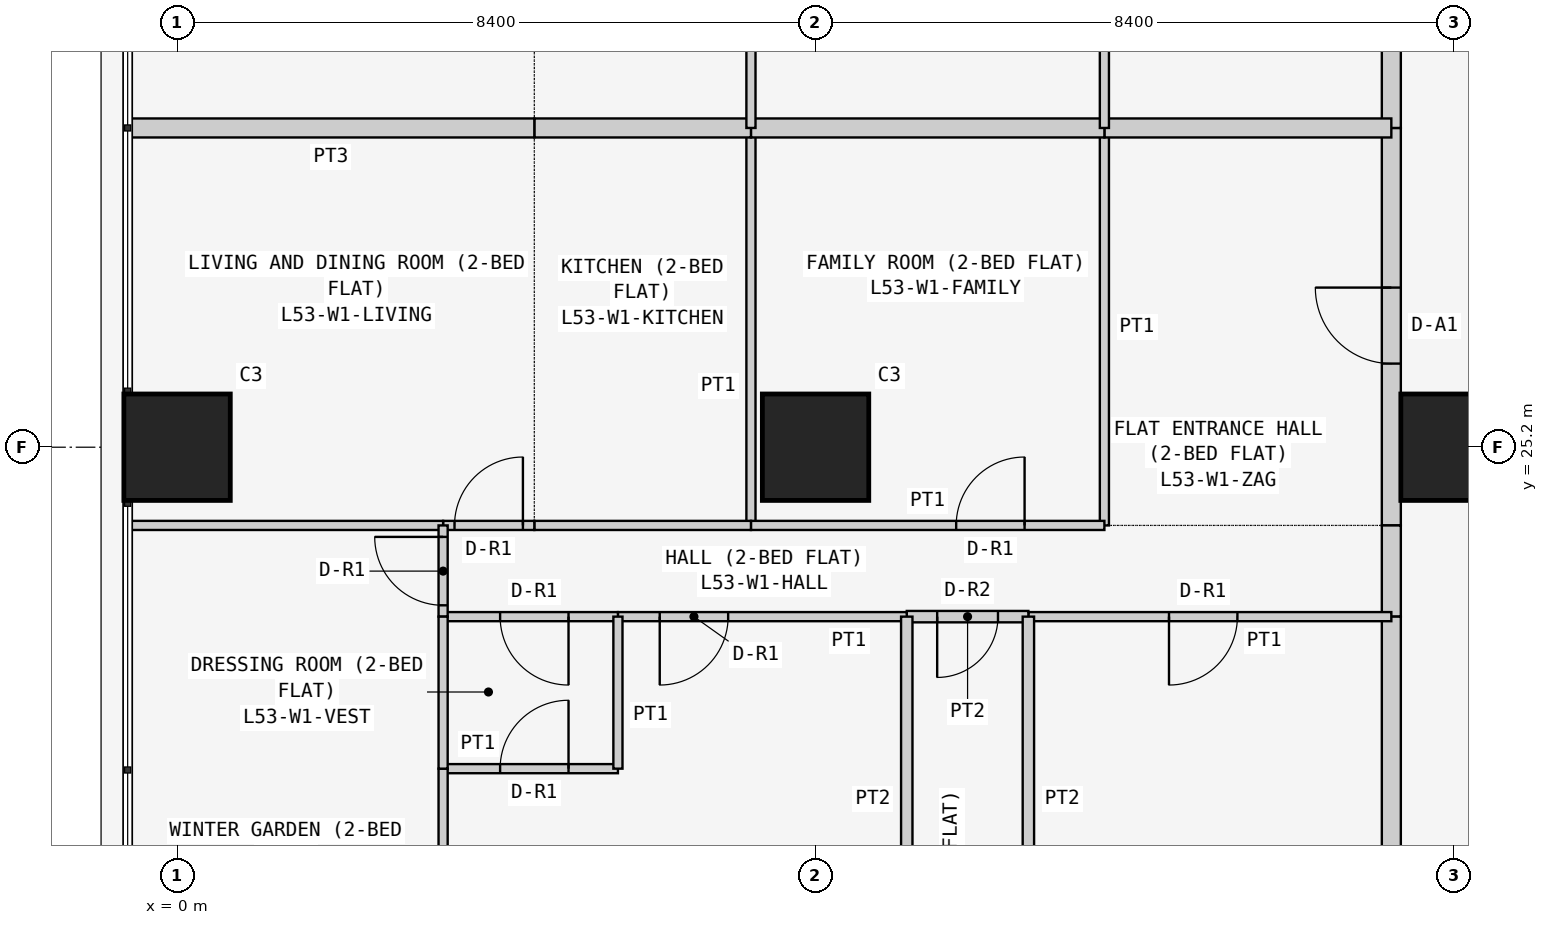
"""IFC4 building model, lengths in metres.
Left out: names, types, materials, properties, quantities, classifications, styles, units other than length and angle.
Written with IfcOpenShell. Run it as: python <this file> out.ifc"""

import sys

from ifc_helpers import new_model, si_unit, direction, frame, frame_2d, origin, origin_2d, place, context, subcontext, project, spatial, rectangle, extrude, element, fill, save


model = new_model("IFC4")
c1 = context("Model", 3, precision=1e-05, world=origin(), true_north=direction((0.0, 1.0)))
c2 = subcontext(c1, "Body", "Model", "MODEL_VIEW")
j1 = project(units=[si_unit("LENGTHUNIT", "METRE"), si_unit("PLANEANGLEUNIT", "RADIAN")], contexts=[c1])
p1 = place(None, origin())
s1 = spatial("IfcSite", under=j1, at=p1, CompositionType="ELEMENT")
p2 = place(p1, origin())
s2 = spatial("IfcBuilding", under=s1, at=p2, CompositionType="ELEMENT")
p3 = place(p2, frame((0.0, 0.0, 204.9)))
s3 = spatial("IfcBuildingStorey", under=s2, at=p3, CompositionType="ELEMENT", Elevation=204.9)
for number, where, z_axis, x_axis in (
    (1, (0.0, 25.2, 0.0), (0.0, 0.0, 1.0), (1.0, 0.0, 0.0)),
    (2, (8.4, 25.2, 0.0), (0.0, 0.0, 1.0), (1.0, 0.0, 0.0)),
    (3, (16.8, 25.2, 0.0), (0.0, 0.0, 1.0), (1.0, 0.0, 0.0)),
):
    element("IfcColumn", number, at=place(p3, frame(where, z_axis=z_axis, x_axis=x_axis)), inside=s3, PredefinedType="COLUMN", context=c2, shape_type="SweptSolid", body=[
        extrude(rectangle(XDim=1.4, YDim=1.4, at=origin_2d()), origin(), (0.0, 0.0, 1.0), 3.6),
    ])
p4 = place(p3, frame((15.975, 24.171, 0.0), z_axis=(0.0, 0.0, 1.0), x_axis=(0.0, 1.0, 0.0)))
e4 = element("IfcWall", 4, at=p4, inside=s3, PredefinedType="PARTITIONING", context=c2, shape_type="SweptSolid", body=[
    extrude(rectangle(XDim=5.229, YDim=0.25, at=frame_2d((2.615, 0.0))), origin(), (0.0, 0.0, 1.0), 3.45),
])
p5 = place(p4, frame((2.129, 0.0, 0.0)))
e5 = element("IfcOpeningElement", 5, at=p5, cuts=e4, PredefinedType="OPENING", context=c2, shape_type="SweptSolid", body=[
    extrude(rectangle(XDim=1.0, YDim=2.1, at=frame_2d((0.5, 1.05))), frame((0.0, 0.135, 0.0), z_axis=(0.0, -1.0, 0.0), x_axis=(1.0, 0.0, 0.0)), (0.0, 0.0, 1.0), 0.27),
])
p6 = place(p3, frame((15.975, 22.971, 0.0), z_axis=(0.0, 0.0, 1.0), x_axis=(0.0, 1.0, 0.0)))
e6 = element("IfcWall", 6, at=p6, inside=s3, PredefinedType="PARTITIONING", context=c2, shape_type="SweptSolid", body=[
    extrude(rectangle(XDim=1.2, YDim=0.25, at=frame_2d((0.6, 0.0))), origin(), (0.0, 0.0, 1.0), 3.45),
])
p7 = place(p3, frame((15.975, 16.1, 0.0), z_axis=(0.0, 0.0, 1.0), x_axis=(0.0, 1.0, 0.0)))
e7 = element("IfcWall", 7, at=p7, inside=s3, PredefinedType="PARTITIONING", context=c2, shape_type="SweptSolid", body=[
    extrude(rectangle(XDim=6.871, YDim=0.25, at=frame_2d((3.436, 0.0))), origin(), (0.0, 0.0, 1.0), 3.45),
])
p8 = place(p3, frame((15.975, 29.4, 0.0), z_axis=(0.0, 0.0, 1.0), x_axis=(0.0, 1.0, 0.0)))
e8 = element("IfcWall", 8, at=p8, inside=s3, PredefinedType="PARTITIONING", context=c2, shape_type="SweptSolid", body=[
    extrude(rectangle(XDim=5.229, YDim=0.25, at=frame_2d((2.615, 0.0))), origin(), (0.0, 0.0, 1.0), 3.45),
])
p9 = place(p8, frame((2.1, 0.0, 0.0)))
e9 = element("IfcOpeningElement", 9, at=p9, cuts=e8, PredefinedType="OPENING", context=c2, shape_type="SweptSolid", body=[
    extrude(rectangle(XDim=1.0, YDim=2.1, at=frame_2d((0.5, 1.05))), frame((0.0, 0.135, 0.0), z_axis=(0.0, -1.0, 0.0), x_axis=(1.0, 0.0, 0.0)), (0.0, 0.0, 1.0), 0.27),
])
p10 = place(p3, frame((12.2, 29.4, 0.0), z_axis=(0.0, 0.0, 1.0), x_axis=(0.0, -1.0, 0.0)))
e10 = element("IfcWall", 10, at=p10, inside=s3, PredefinedType="PARTITIONING", context=c2, shape_type="SweptSolid", body=[
    extrude(rectangle(XDim=5.229, YDim=0.12, at=frame_2d((2.615, 0.0))), origin(), (0.0, 0.0, 1.0), 3.45),
])
p11 = place(p3, frame((15.975, 29.4, 0.0), z_axis=(0.0, 0.0, 1.0), x_axis=(-1.0, 0.0, 0.0)))
e11 = element("IfcWall", 11, at=p11, inside=s3, PredefinedType="PARTITIONING", context=c2, shape_type="SweptSolid", body=[
    extrude(rectangle(XDim=3.775, YDim=0.25, at=frame_2d((1.888, 0.0))), origin(), (0.0, 0.0, 1.0), 3.45),
])
p12 = place(p3, frame((7.55, 29.4, 0.0), z_axis=(0.0, 0.0, 1.0), x_axis=(0.0, -1.0, 0.0)))
e12 = element("IfcWall", 12, at=p12, inside=s3, PredefinedType="PARTITIONING", context=c2, shape_type="SweptSolid", body=[
    extrude(rectangle(XDim=5.229, YDim=0.12, at=frame_2d((2.615, 0.0))), origin(), (0.0, 0.0, 1.0), 3.45),
])
p13 = place(p3, frame((7.55, 24.171, 0.0), z_axis=(0.0, 0.0, 1.0), x_axis=(1.0, 0.0, 0.0)))
e13 = element("IfcWall", 13, at=p13, inside=s3, PredefinedType="PARTITIONING", context=c2, shape_type="SweptSolid", body=[
    extrude(rectangle(XDim=4.65, YDim=0.12, at=frame_2d((2.325, 0.0))), origin(), (0.0, 0.0, 1.0), 3.45),
])
p14 = place(p13, frame((2.7, 0.0, 0.0)))
e14 = element("IfcOpeningElement", 14, at=p14, cuts=e13, PredefinedType="OPENING", context=c2, shape_type="SweptSolid", body=[
    extrude(rectangle(XDim=0.9, YDim=2.1, at=frame_2d((0.45, 1.05))), frame((0.0, 0.07, 0.0), z_axis=(0.0, -1.0, 0.0), x_axis=(1.0, 0.0, 0.0)), (0.0, 0.0, 1.0), 0.14),
])
p15 = place(p3, frame((12.2, 29.4, 0.0), z_axis=(0.0, 0.0, 1.0), x_axis=(-1.0, 0.0, 0.0)))
e15 = element("IfcWall", 15, at=p15, inside=s3, PredefinedType="PARTITIONING", context=c2, shape_type="SweptSolid", body=[
    extrude(rectangle(XDim=4.65, YDim=0.25, at=frame_2d((2.325, 0.0))), origin(), (0.0, 0.0, 1.0), 3.45),
])
p16 = place(p3, frame((4.7, 24.171, 0.0), z_axis=(0.0, 0.0, 1.0), x_axis=(1.0, 0.0, 0.0)))
e16 = element("IfcWall", 16, at=p16, inside=s3, PredefinedType="PARTITIONING", context=c2, shape_type="SweptSolid", body=[
    extrude(rectangle(XDim=2.85, YDim=0.12, at=frame_2d((1.425, 0.0))), origin(), (0.0, 0.0, 1.0), 3.45),
])
p17 = place(p3, frame((7.55, 29.4, 0.0), z_axis=(0.0, 0.0, 1.0), x_axis=(-1.0, 0.0, 0.0)))
e17 = element("IfcWall", 17, at=p17, inside=s3, PredefinedType="PARTITIONING", context=c2, shape_type="SweptSolid", body=[
    extrude(rectangle(XDim=2.85, YDim=0.25, at=frame_2d((1.425, 0.0))), origin(), (0.0, 0.0, 1.0), 3.45),
])
p18 = place(p3, frame((3.5, 24.171, 0.0), z_axis=(0.0, 0.0, 1.0), x_axis=(1.0, 0.0, 0.0)))
e18 = element("IfcWall", 18, at=p18, inside=s3, PredefinedType="PARTITIONING", context=c2, shape_type="SweptSolid", body=[
    extrude(rectangle(XDim=1.2, YDim=0.12, at=frame_2d((0.6, 0.0))), origin(), (0.0, 0.0, 1.0), 3.45),
])
p19 = place(p18, frame((0.15, 0.0, 0.0)))
e19 = element("IfcOpeningElement", 19, at=p19, cuts=e18, PredefinedType="OPENING", context=c2, shape_type="SweptSolid", body=[
    extrude(rectangle(XDim=0.9, YDim=2.1, at=frame_2d((0.45, 1.05))), frame((0.0, 0.07, 0.0), z_axis=(0.0, -1.0, 0.0), x_axis=(1.0, 0.0, 0.0)), (0.0, 0.0, 1.0), 0.14),
])
p20 = place(p3, frame((-0.65, 24.171, 0.0), z_axis=(0.0, 0.0, 1.0), x_axis=(1.0, 0.0, 0.0)))
e20 = element("IfcWall", 20, at=p20, inside=s3, PredefinedType="PARTITIONING", context=c2, shape_type="SweptSolid", body=[
    extrude(rectangle(XDim=4.15, YDim=0.12, at=frame_2d((2.075, 0.0))), origin(), (0.0, 0.0, 1.0), 3.45),
])
p21 = place(p3, frame((4.7, 29.4, 0.0), z_axis=(0.0, 0.0, 1.0), x_axis=(-1.0, 0.0, 0.0)))
e21 = element("IfcWall", 21, at=p21, inside=s3, PredefinedType="PARTITIONING", context=c2, shape_type="SweptSolid", body=[
    extrude(rectangle(XDim=5.35, YDim=0.25, at=frame_2d((2.675, 0.0))), origin(), (0.0, 0.0, 1.0), 3.45),
])
p22 = place(p3, frame((11.2, 22.971, 0.0), z_axis=(0.0, 0.0, 1.0), x_axis=(1.0, 0.0, 0.0)))
e22 = element("IfcWall", 22, at=p22, inside=s3, PredefinedType="PARTITIONING", context=c2, shape_type="SweptSolid", body=[
    extrude(rectangle(XDim=4.775, YDim=0.12, at=frame_2d((2.388, 0.0))), origin(), (0.0, 0.0, 1.0), 3.45),
])
p23 = place(p22, frame((1.85, 0.0, 0.0)))
e23 = element("IfcOpeningElement", 23, at=p23, cuts=e22, PredefinedType="OPENING", context=c2, shape_type="SweptSolid", body=[
    extrude(rectangle(XDim=0.9, YDim=2.1, at=frame_2d((0.45, 1.05))), frame((0.0, 0.07, 0.0), z_axis=(0.0, -1.0, 0.0), x_axis=(1.0, 0.0, 0.0)), (0.0, 0.0, 1.0), 0.14),
])
p24 = place(p3, frame((9.6, 22.971, 0.0), z_axis=(0.0, 0.0, 1.0), x_axis=(1.0, 0.0, 0.0)))
e24 = element("IfcWall", 24, at=p24, inside=s3, PredefinedType="PARTITIONING", context=c2, shape_type="SweptSolid", body=[
    extrude(rectangle(XDim=1.6, YDim=0.15, at=frame_2d((0.8, 0.0))), origin(), (0.0, 0.0, 1.0), 3.45),
])
p25 = place(p24, frame((0.4, 0.0, 0.0)))
e25 = element("IfcOpeningElement", 25, at=p25, cuts=e24, PredefinedType="OPENING", context=c2, shape_type="SweptSolid", body=[
    extrude(rectangle(XDim=0.8, YDim=2.1, at=frame_2d((0.4, 1.05))), frame((0.0, 0.085, 0.0), z_axis=(0.0, -1.0, 0.0), x_axis=(1.0, 0.0, 0.0)), (0.0, 0.0, 1.0), 0.17),
])
p26 = place(p3, frame((5.8, 22.971, 0.0), z_axis=(0.0, 0.0, 1.0), x_axis=(1.0, 0.0, 0.0)))
e26 = element("IfcWall", 26, at=p26, inside=s3, PredefinedType="PARTITIONING", context=c2, shape_type="SweptSolid", body=[
    extrude(rectangle(XDim=3.8, YDim=0.12, at=frame_2d((1.9, 0.0))), origin(), (0.0, 0.0, 1.0), 3.45),
])
p27 = place(p26, frame((0.55, 0.0, 0.0)))
e27 = element("IfcOpeningElement", 27, at=p27, cuts=e26, PredefinedType="OPENING", context=c2, shape_type="SweptSolid", body=[
    extrude(rectangle(XDim=0.9, YDim=2.1, at=frame_2d((0.45, 1.05))), frame((0.0, 0.07, 0.0), z_axis=(0.0, -1.0, 0.0), x_axis=(1.0, 0.0, 0.0)), (0.0, 0.0, 1.0), 0.14),
])
p28 = place(p3, frame((3.5, 22.971, 0.0), z_axis=(0.0, 0.0, 1.0), x_axis=(1.0, 0.0, 0.0)))
e28 = element("IfcWall", 28, at=p28, inside=s3, PredefinedType="PARTITIONING", context=c2, shape_type="SweptSolid", body=[
    extrude(rectangle(XDim=2.3, YDim=0.12, at=frame_2d((1.15, 0.0))), origin(), (0.0, 0.0, 1.0), 3.45),
])
p29 = place(p28, frame((0.75, 0.0, 0.0)))
e29 = element("IfcOpeningElement", 29, at=p29, cuts=e28, PredefinedType="OPENING", context=c2, shape_type="SweptSolid", body=[
    extrude(rectangle(XDim=0.9, YDim=2.1, at=frame_2d((0.45, 1.05))), frame((0.0, 0.07, 0.0), z_axis=(0.0, -1.0, 0.0), x_axis=(1.0, 0.0, 0.0)), (0.0, 0.0, 1.0), 0.14),
])
p30 = place(p3, frame((3.5, 24.171, 0.0), z_axis=(0.0, 0.0, 1.0), x_axis=(0.0, -1.0, 0.0)))
e30 = element("IfcWall", 30, at=p30, inside=s3, PredefinedType="PARTITIONING", context=c2, shape_type="SweptSolid", body=[
    extrude(rectangle(XDim=1.2, YDim=0.12, at=frame_2d((0.6, 0.0))), origin(), (0.0, 0.0, 1.0), 3.45),
])
p31 = place(p30, frame((0.151, 0.0, 0.0)))
e31 = element("IfcOpeningElement", 31, at=p31, cuts=e30, PredefinedType="OPENING", context=c2, shape_type="SweptSolid", body=[
    extrude(rectangle(XDim=0.9, YDim=2.1, at=frame_2d((0.45, 1.05))), frame((0.0, 0.07, 0.0), z_axis=(0.0, -1.0, 0.0), x_axis=(1.0, 0.0, 0.0)), (0.0, 0.0, 1.0), 0.14),
])
for number, where, z_axis, x_axis in (
    (32, (11.2, 22.971, 0.0), (0.0, 0.0, 1.0), (0.0, -1.0, 0.0)),
    (33, (9.6, 22.971, 0.0), (0.0, 0.0, 1.0), (0.0, -1.0, 0.0)),
):
    element("IfcWall", number, at=place(p3, frame(where, z_axis=z_axis, x_axis=x_axis)), inside=s3, PredefinedType="PARTITIONING", context=c2, shape_type="SweptSolid", body=[
        extrude(rectangle(XDim=6.871, YDim=0.15, at=frame_2d((3.436, 0.0))), origin(), (0.0, 0.0, 1.0), 3.45),
    ])
p32 = place(p3, frame((3.5, 20.971, 0.0), z_axis=(0.0, 0.0, 1.0), x_axis=(1.0, 0.0, 0.0)))
e34 = element("IfcWall", 34, at=p32, inside=s3, PredefinedType="PARTITIONING", context=c2, shape_type="SweptSolid", body=[
    extrude(rectangle(XDim=2.3, YDim=0.12, at=frame_2d((1.15, 0.0))), origin(), (0.0, 0.0, 1.0), 3.45),
])
p33 = place(p32, frame((0.75, 0.0, 0.0)))
e35 = element("IfcOpeningElement", 35, at=p33, cuts=e34, PredefinedType="OPENING", context=c2, shape_type="SweptSolid", body=[
    extrude(rectangle(XDim=0.9, YDim=2.1, at=frame_2d((0.45, 1.05))), frame((0.0, 0.07, 0.0), z_axis=(0.0, -1.0, 0.0), x_axis=(1.0, 0.0, 0.0)), (0.0, 0.0, 1.0), 0.14),
])
p34 = place(p3, frame((5.8, 20.971, 0.0), z_axis=(0.0, 0.0, 1.0), x_axis=(0.0, 1.0, 0.0)))
e36 = element("IfcWall", 36, at=p34, inside=s3, PredefinedType="PARTITIONING", context=c2, shape_type="SweptSolid", body=[
    extrude(rectangle(XDim=2.0, YDim=0.12, at=frame_2d((1.0, 0.0))), origin(), (0.0, 0.0, 1.0), 3.45),
])
p35 = place(p3, frame((3.5, 16.1, 0.0), z_axis=(0.0, 0.0, 1.0), x_axis=(0.0, 1.0, 0.0)))
e37 = element("IfcWall", 37, at=p35, inside=s3, PredefinedType="PARTITIONING", context=c2, shape_type="SweptSolid", body=[
    extrude(rectangle(XDim=4.871, YDim=0.12, at=frame_2d((2.436, 0.0))), origin(), (0.0, 0.0, 1.0), 3.45),
])
p36 = place(p3, frame((3.5, 22.971, 0.0), z_axis=(0.0, 0.0, 1.0), x_axis=(0.0, -1.0, 0.0)))
e38 = element("IfcWall", 38, at=p36, inside=s3, PredefinedType="PARTITIONING", context=c2, shape_type="SweptSolid", body=[
    extrude(rectangle(XDim=2.0, YDim=0.12, at=frame_2d((1.0, 0.0))), origin(), (0.0, 0.0, 1.0), 3.45),
])
for number, where, z_axis, x_axis in (
    (39, (12.2, 29.4, 0.0), (0.0, 0.0, 1.0), (0.0, 1.0, 0.0)),
    (40, (7.55, 29.4, 0.0), (0.0, 0.0, 1.0), (0.0, 1.0, 0.0)),
):
    element("IfcWall", number, at=place(p3, frame(where, z_axis=z_axis, x_axis=x_axis)), inside=s3, PredefinedType="PARTITIONING", context=c2, shape_type="SweptSolid", body=[
        extrude(rectangle(XDim=5.229, YDim=0.12, at=frame_2d((2.615, 0.0))), origin(), (0.0, 0.0, 1.0), 3.45),
    ])
p37 = place(p5, origin())
e41 = element("IfcDoor", 41, at=p37, inside=s3, OperationType="SINGLE_SWING_RIGHT", PredefinedType="DOOR", context=c2, shape_type="SweptSolid", body=[
    extrude(rectangle(XDim=1.0, YDim=2.1, at=frame_2d((0.5, 1.05))), frame((0.0, 0.025, 0.0), z_axis=(0.0, -1.0, 0.0), x_axis=(1.0, 0.0, 0.0)), (0.0, 0.0, 1.0), 0.05),
])
fill(e5, e41)
p38 = place(p14, origin())
e42 = element("IfcDoor", 42, at=p38, inside=s3, OperationType="SINGLE_SWING_RIGHT", PredefinedType="DOOR", context=c2, shape_type="SweptSolid", body=[
    extrude(rectangle(XDim=0.9, YDim=2.1, at=frame_2d((0.45, 1.05))), frame((0.0, 0.025, 0.0), z_axis=(0.0, -1.0, 0.0), x_axis=(1.0, 0.0, 0.0)), (0.0, 0.0, 1.0), 0.05),
])
fill(e14, e42)
p39 = place(p19, origin())
e43 = element("IfcDoor", 43, at=p39, inside=s3, OperationType="SINGLE_SWING_RIGHT", PredefinedType="DOOR", context=c2, shape_type="SweptSolid", body=[
    extrude(rectangle(XDim=0.9, YDim=2.1, at=frame_2d((0.45, 1.05))), frame((0.0, 0.025, 0.0), z_axis=(0.0, -1.0, 0.0), x_axis=(1.0, 0.0, 0.0)), (0.0, 0.0, 1.0), 0.05),
])
fill(e19, e43)
p40 = place(p23, frame((0.9, 0.0, 0.0), z_axis=(0.0, 0.0, 1.0), x_axis=(-1.0, 0.0, 0.0)))
e44 = element("IfcDoor", 44, at=p40, inside=s3, OperationType="SINGLE_SWING_RIGHT", PredefinedType="DOOR", context=c2, shape_type="SweptSolid", body=[
    extrude(rectangle(XDim=0.9, YDim=2.1, at=frame_2d((0.45, 1.05))), frame((0.0, 0.025, 0.0), z_axis=(0.0, -1.0, 0.0), x_axis=(1.0, 0.0, 0.0)), (0.0, 0.0, 1.0), 0.05),
])
fill(e23, e44)
p41 = place(p25, frame((0.8, 0.0, 0.0), z_axis=(0.0, 0.0, 1.0), x_axis=(-1.0, 0.0, 0.0)))
e45 = element("IfcDoor", 45, at=p41, inside=s3, OperationType="SINGLE_SWING_RIGHT", PredefinedType="DOOR", context=c2, shape_type="SweptSolid", body=[
    extrude(rectangle(XDim=0.8, YDim=2.1, at=frame_2d((0.4, 1.05))), frame((0.0, 0.025, 0.0), z_axis=(0.0, -1.0, 0.0), x_axis=(1.0, 0.0, 0.0)), (0.0, 0.0, 1.0), 0.05),
])
fill(e25, e45)
p42 = place(p27, frame((0.9, 0.0, 0.0), z_axis=(0.0, 0.0, 1.0), x_axis=(-1.0, 0.0, 0.0)))
e46 = element("IfcDoor", 46, at=p42, inside=s3, OperationType="SINGLE_SWING_RIGHT", PredefinedType="DOOR", context=c2, shape_type="SweptSolid", body=[
    extrude(rectangle(XDim=0.9, YDim=2.1, at=frame_2d((0.45, 1.05))), frame((0.0, 0.025, 0.0), z_axis=(0.0, -1.0, 0.0), x_axis=(1.0, 0.0, 0.0)), (0.0, 0.0, 1.0), 0.05),
])
fill(e27, e46)
p43 = place(p29, frame((0.9, 0.0, 0.0), z_axis=(0.0, 0.0, 1.0), x_axis=(-1.0, 0.0, 0.0)))
e47 = element("IfcDoor", 47, at=p43, inside=s3, OperationType="SINGLE_SWING_LEFT", PredefinedType="DOOR", context=c2, shape_type="SweptSolid", body=[
    extrude(rectangle(XDim=0.9, YDim=2.1, at=frame_2d((0.45, 1.05))), frame((0.0, 0.025, 0.0), z_axis=(0.0, -1.0, 0.0), x_axis=(1.0, 0.0, 0.0)), (0.0, 0.0, 1.0), 0.05),
])
fill(e29, e47)
p44 = place(p33, origin())
e48 = element("IfcDoor", 48, at=p44, inside=s3, OperationType="SINGLE_SWING_RIGHT", PredefinedType="DOOR", context=c2, shape_type="SweptSolid", body=[
    extrude(rectangle(XDim=0.9, YDim=2.1, at=frame_2d((0.45, 1.05))), frame((0.0, 0.025, 0.0), z_axis=(0.0, -1.0, 0.0), x_axis=(1.0, 0.0, 0.0)), (0.0, 0.0, 1.0), 0.05),
])
fill(e35, e48)
p45 = place(p31, frame((0.9, 0.0, 0.0), z_axis=(0.0, 0.0, 1.0), x_axis=(-1.0, 0.0, 0.0)))
e49 = element("IfcDoor", 49, at=p45, inside=s3, OperationType="SINGLE_SWING_RIGHT", PredefinedType="DOOR", context=c2, shape_type="SweptSolid", body=[
    extrude(rectangle(XDim=0.9, YDim=2.1, at=frame_2d((0.45, 1.05))), frame((0.0, 0.025, 0.0), z_axis=(0.0, -1.0, 0.0), x_axis=(1.0, 0.0, 0.0)), (0.0, 0.0, 1.0), 0.05),
])
fill(e31, e49)
save(model, sys.argv[1])
